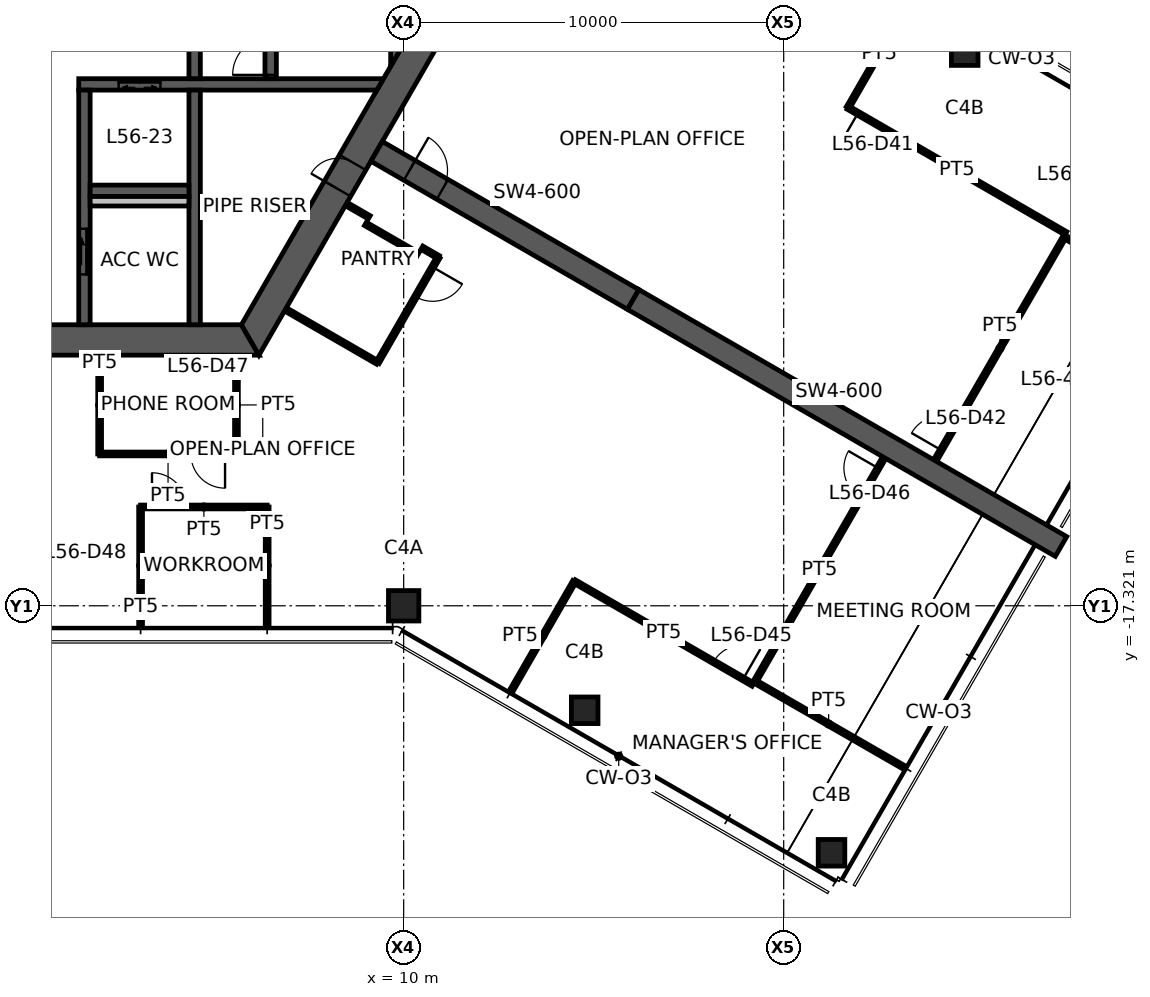
"""IFC4 building model, lengths in metres.
Left out: names, types, materials, properties, quantities, classifications, styles, units other than length and angle.
Written with IfcOpenShell. Run it as: python <this file> out.ifc"""

import sys

from ifc_helpers import new_model, si_unit, direction, frame, frame_2d, origin, origin_2d, place, context, subcontext, project, spatial, polyline, rectangle, hollow_rectangle, outline, extrude, element, fill, save


model = new_model("IFC4")
c1 = context("Model", 3, precision=1e-05, world=origin(), true_north=direction((0.0, 1.0)))
c2 = subcontext(c1, "Body", "Model", "MODEL_VIEW")
j1 = project(units=[si_unit("LENGTHUNIT", "METRE"), si_unit("PLANEANGLEUNIT", "RADIAN")], contexts=[c1])
p1 = place(None, origin())
s1 = spatial("IfcSite", under=j1, at=p1, CompositionType="ELEMENT")
p2 = place(p1, origin())
s2 = spatial("IfcBuilding", under=s1, at=p2, CompositionType="ELEMENT")
p3 = place(p2, frame((0.0, 0.0, 224.5)))
s3 = spatial("IfcBuildingStorey", under=s2, at=p3, CompositionType="ELEMENT", Elevation=224.5)
p4 = place(p3, frame((10.0, -17.321, 0.0), z_axis=(0.0, 0.0, 1.0), x_axis=(1.0, 0.0, 0.0)))
e1 = element("IfcColumn", 1, at=p4, inside=s3, PredefinedType="COLUMN", context=c2, shape_type="SweptSolid", body=[
    extrude(hollow_rectangle(XDim=0.8, YDim=0.8, WallThickness=0.04, at=origin_2d()), origin(), (0.0, 0.0, 1.0), 3.9),
])
for number, where, z_axis, x_axis in (
    (2, (14.763, -20.071, 0.0), (0.0, 0.0, 1.0), (1.0, 0.0, 0.0)),
    (3, (21.258, -23.821, 0.0), (0.0, 0.0, 1.0), (1.0, 0.0, 0.0)),
    (4, (24.763, -2.75, 0.0), (0.0, 0.0, 1.0), (1.0, 0.0, 0.0)),
):
    element("IfcColumn", number, at=place(p3, frame(where, z_axis=z_axis, x_axis=x_axis)), inside=s3, PredefinedType="COLUMN", context=c2, shape_type="SweptSolid", body=[
        extrude(hollow_rectangle(XDim=0.7, YDim=0.7, WallThickness=0.032, at=origin_2d()), origin(), (0.0, 0.0, 1.0), 3.9),
    ])
p5 = place(p3, frame((-5.961, -10.325, 0.0), z_axis=(0.0, 0.0, 1.0), x_axis=(1.0, 0.0, 0.0)))
e5 = element("IfcWall", 5, at=p5, inside=s3, PredefinedType="SHEAR", context=c2, shape_type="SweptSolid", body=[
    extrude(outline(polyline([(-0.231, -0.4), (5.461, -0.4), (6.461, -0.4), (12.153, -0.4), (11.691, 0.4), (6.461, 0.4), (5.461, 0.4), (0.231, 0.4), (-0.231, -0.4)])), origin(), (0.0, 0.0, 1.0), 3.9),
])
p6 = place(p5, frame((5.461, 0.0, 0.0)))
e6 = element("IfcOpeningElement", 6, at=p6, cuts=e5, PredefinedType="OPENING", context=c2, shape_type="SweptSolid", body=[
    extrude(rectangle(XDim=1.0, YDim=2.1, at=frame_2d((0.5, 1.05))), frame((0.0, 0.41, 0.0), z_axis=(0.0, -1.0, 0.0), x_axis=(1.0, 0.0, 0.0)), (0.0, 0.0, 1.0), 0.82),
])
p7 = place(p3, frame((5.961, -10.325, 0.0), z_axis=(0.0, 0.0, 1.0), x_axis=(0.500004296715, 0.866022923061, 0.0)))
e7 = element("IfcWall", 7, at=p7, inside=s3, PredefinedType="SHEAR", context=c2, shape_type="SweptSolid", body=[
    extrude(outline(polyline([(-0.231, -0.4), (4.594, -0.4), (5.394, -0.4), (12.153, -0.4), (11.691, 0.4), (5.394, 0.4), (4.594, 0.4), (0.231, 0.4), (-0.231, -0.4)])), origin(), (0.0, 0.0, 1.0), 3.9),
])
p8 = place(p7, frame((4.594, 0.0, 0.0)))
e8 = element("IfcOpeningElement", 8, at=p8, cuts=e7, PredefinedType="OPENING", context=c2, shape_type="SweptSolid", body=[
    extrude(rectangle(XDim=0.8, YDim=2.1, at=frame_2d((0.4, 1.05))), frame((0.0, 0.41, 0.0), z_axis=(0.0, -1.0, 0.0), x_axis=(1.0, 0.0, 0.0)), (0.0, 0.0, 1.0), 0.82),
])
p9 = place(p3, frame((9.288, -5.363, 0.0), z_axis=(0.0, 0.0, 1.0), x_axis=(0.866031736626, -0.499989031036, 0.0)))
e9 = element("IfcWall", 9, at=p9, inside=s3, PredefinedType="SHEAR", context=c2, shape_type="SweptSolid", body=[
    extrude(rectangle(XDim=7.796, YDim=0.6, at=frame_2d((3.898, 0.0))), origin(), (0.0, 0.0, 1.0), 3.9),
])
p10 = place(p9, frame((1.0, 0.0, 0.0)))
e10 = element("IfcOpeningElement", 10, at=p10, cuts=e9, PredefinedType="OPENING", context=c2, shape_type="SweptSolid", body=[
    extrude(rectangle(XDim=1.0, YDim=2.1, at=frame_2d((0.5, 1.05))), frame((0.0, 0.31, 0.0), z_axis=(0.0, -1.0, 0.0), x_axis=(1.0, 0.0, 0.0)), (0.0, 0.0, 1.0), 0.62),
])
p11 = place(p3, frame((16.039, -9.26, 0.0), z_axis=(0.0, 0.0, 1.0), x_axis=(0.866024837091, -0.50000098154, 0.0)))
e11 = element("IfcWall", 11, at=p11, inside=s3, PredefinedType="SHEAR", context=c2, shape_type="SweptSolid", body=[
    extrude(rectangle(XDim=13.0, YDim=0.6, at=frame_2d((6.5, 0.0))), origin(), (0.0, 0.0, 1.0), 3.9),
])
p12 = place(p3, frame((1.45, -3.6, 0.0), z_axis=(0.0, 0.0, 1.0), x_axis=(1.0, 0.0, 0.0)))
e12 = element("IfcWall", 12, at=p12, inside=s3, PredefinedType="SHEAR", context=c2, shape_type="SweptSolid", body=[
    extrude(outline(polyline([(0.0, -0.15), (1.05, -0.15), (2.15, -0.15), (7.845, -0.15), (8.019, 0.15), (2.15, 0.15), (1.05, 0.15), (0.0, 0.15), (0.0, -0.15)])), origin(), (0.0, 0.0, 1.0), 3.9),
])
p13 = place(p12, frame((1.05, 0.0, 0.0)))
e13 = element("IfcOpeningElement", 13, at=p13, cuts=e12, PredefinedType="OPENING", context=c2, shape_type="SweptSolid", body=[
    extrude(rectangle(XDim=1.1, YDim=2.1, at=frame_2d((0.55, 1.05))), frame((0.0, 0.16, 0.0), z_axis=(0.0, -1.0, 0.0), x_axis=(1.0, 0.0, 0.0)), (0.0, 0.0, 1.0), 0.32),
])
p14 = place(p3, frame((1.6, -3.75, 0.0), z_axis=(0.0, 0.0, 1.0), x_axis=(0.0, -1.0, 0.0)))
e14 = element("IfcWall", 14, at=p14, inside=s3, PredefinedType="SHEAR", context=c2, shape_type="SweptSolid", body=[
    extrude(rectangle(XDim=6.175, YDim=0.3, at=frame_2d((3.087, 0.0))), origin(), (0.0, 0.0, 1.0), 3.9),
])
p15 = place(p14, frame((3.65, 0.0, 0.0)))
e15 = element("IfcOpeningElement", 15, at=p15, cuts=e14, PredefinedType="OPENING", context=c2, shape_type="SweptSolid", body=[
    extrude(rectangle(XDim=1.2, YDim=2.1, at=frame_2d((0.6, 1.05))), frame((0.0, 0.16, 0.0), z_axis=(0.0, -1.0, 0.0), x_axis=(1.0, 0.0, 0.0)), (0.0, 0.0, 1.0), 0.32),
])
p16 = place(p3, frame((4.5, -3.45, 0.0), z_axis=(0.0, 0.0, 1.0), x_axis=(0.0, 1.0, 0.0)))
e16 = element("IfcWall", 16, at=p16, inside=s3, PredefinedType="SHEAR", context=c2, shape_type="SweptSolid", body=[
    extrude(rectangle(XDim=6.9, YDim=0.3, at=frame_2d((3.45, 0.0))), origin(), (0.0, 0.0, 1.0), 3.9),
])
p17 = place(p16, frame((2.95, 0.0, 0.0)))
e17 = element("IfcOpeningElement", 17, at=p17, cuts=e16, PredefinedType="OPENING", context=c2, shape_type="SweptSolid", body=[
    extrude(rectangle(XDim=1.0, YDim=2.1, at=frame_2d((0.5, 1.05))), frame((0.0, 0.16, 0.0), z_axis=(0.0, -1.0, 0.0), x_axis=(1.0, 0.0, 0.0)), (0.0, 0.0, 1.0), 0.32),
])
p18 = place(p3, frame((6.5, -3.45, 0.0), z_axis=(0.0, 0.0, 1.0), x_axis=(0.0, 1.0, 0.0)))
e18 = element("IfcWall", 18, at=p18, inside=s3, PredefinedType="SHEAR", context=c2, shape_type="SweptSolid", body=[
    extrude(rectangle(XDim=6.9, YDim=0.3, at=frame_2d((3.45, 0.0))), origin(), (0.0, 0.0, 1.0), 3.9),
])
p19 = place(p18, frame((0.1, 0.0, 0.0)))
e19 = element("IfcOpeningElement", 19, at=p19, cuts=e18, PredefinedType="OPENING", context=c2, shape_type="SweptSolid", body=[
    extrude(rectangle(XDim=1.0, YDim=2.1, at=frame_2d((0.5, 1.05))), frame((0.0, 0.16, 0.0), z_axis=(0.0, -1.0, 0.0), x_axis=(1.0, 0.0, 0.0)), (0.0, 0.0, 1.0), 0.32),
])
p20 = place(p3, frame((4.5, -3.75, 0.0), z_axis=(0.0, 0.0, 1.0), x_axis=(0.0, -1.0, 0.0)))
e20 = element("IfcWall", 20, at=p20, inside=s3, PredefinedType="SHEAR", context=c2, shape_type="SweptSolid", body=[
    extrude(rectangle(XDim=6.175, YDim=0.3, at=frame_2d((3.087, 0.0))), origin(), (0.0, 0.0, 1.0), 3.9),
])
p21 = place(p3, frame((1.75, -6.4, 0.0), z_axis=(0.0, 0.0, 1.0), x_axis=(1.0, 0.0, 0.0)))
e21 = element("IfcWall", 21, at=p21, inside=s3, PredefinedType="SHEAR", context=c2, shape_type="SweptSolid", body=[
    extrude(rectangle(XDim=2.6, YDim=0.3, at=frame_2d((1.3, 0.0))), origin(), (0.0, 0.0, 1.0), 3.9),
])
p22 = place(p3, frame((9.808, -2.862, 0.0), z_axis=(0.0, 0.0, 1.0), x_axis=(0.0, 1.0, 0.0)))
e22 = element("IfcWall", 22, at=p22, inside=s3, PredefinedType="SHEAR", context=c2, shape_type="SweptSolid", body=[
    extrude(outline(polyline([(0.26, -0.15), (5.465, -0.15), (5.984, 0.15), (-0.26, 0.15), (0.26, -0.15)])), origin(), (0.0, 0.0, 1.0), 3.9),
])
p23 = place(p3, frame((1.75, -6.675, 0.0), z_axis=(0.0, 0.0, 1.0), x_axis=(1.0, 0.0, 0.0)))
e23 = element("IfcWall", 23, at=p23, inside=s3, PredefinedType="PLUMBINGWALL", context=c2, shape_type="SweptSolid", body=[
    extrude(rectangle(XDim=2.6, YDim=0.25, at=frame_2d((1.3, 0.0))), origin(), (0.0, 0.0, 1.0), 3.9),
])
p24 = place(p3, frame((30.25, -9.266, 0.0), z_axis=(0.0, 0.0, 1.0), x_axis=(-0.865342122637, 0.501181614577, 0.0)))
e24 = element("IfcWall", 24, at=p24, inside=s3, PredefinedType="PARTITIONING", context=c2, shape_type="SweptSolid", body=[
    extrude(rectangle(XDim=3.311, YDim=0.1, at=frame_2d((1.655, 0.0))), origin(), (0.0, 0.0, 1.0), 2.95),
])
p25 = place(p3, frame((21.692, -4.21, 0.0), z_axis=(0.0, 0.0, 1.0), x_axis=(0.50002956483, 0.866008333849, 0.0)))
e25 = element("IfcWall", 25, at=p25, inside=s3, PredefinedType="PARTITIONING", context=c2, shape_type="SweptSolid", body=[
    extrude(rectangle(XDim=3.28, YDim=0.1, at=frame_2d((1.64, 0.0))), origin(), (0.0, 0.0, 1.0), 2.95),
])
p26 = place(p3, frame((27.425, -7.52, 0.0), z_axis=(0.0, 0.0, 1.0), x_axis=(-0.866030817826, 0.499990622488, 0.0)))
e26 = element("IfcWall", 26, at=p26, inside=s3, PredefinedType="PARTITIONING", context=c2, shape_type="SweptSolid", body=[
    extrude(rectangle(XDim=6.62, YDim=0.1, at=frame_2d((3.31, 0.0))), origin(), (0.0, 0.0, 1.0), 2.95),
])
p27 = place(p26, frame((5.42, 0.0, 0.0)))
e27 = element("IfcOpeningElement", 27, at=p27, cuts=e26, PredefinedType="OPENING", context=c2, shape_type="SweptSolid", body=[
    extrude(rectangle(XDim=0.9, YDim=2.1, at=frame_2d((0.45, 1.05))), frame((0.0, 0.06, 0.0), z_axis=(0.0, -1.0, 0.0), x_axis=(1.0, 0.0, 0.0)), (0.0, 0.0, 1.0), 0.12),
])
p28 = place(p3, frame((23.993, -13.483, 0.0), z_axis=(0.0, 0.0, 1.0), x_axis=(0.500522347083, 0.865723616445, 0.0)))
e28 = element("IfcWall", 28, at=p28, inside=s3, PredefinedType="PARTITIONING", context=c2, shape_type="SweptSolid", body=[
    extrude(rectangle(XDim=6.78, YDim=0.1, at=frame_2d((3.39, 0.0))), origin(), (0.0, 0.0, 1.0), 2.95),
])
p29 = place(p28, frame((0.3, 0.0, 0.0)))
e29 = element("IfcOpeningElement", 29, at=p29, cuts=e28, PredefinedType="OPENING", context=c2, shape_type="SweptSolid", body=[
    extrude(rectangle(XDim=0.9, YDim=2.1, at=frame_2d((0.45, 1.05))), frame((0.0, 0.06, 0.0), z_axis=(0.0, -1.0, 0.0), x_axis=(1.0, 0.0, 0.0)), (0.0, 0.0, 1.0), 0.12),
])
p30 = place(p3, frame((8.505, -6.758, 0.0), z_axis=(0.0, 0.0, 1.0), x_axis=(0.865958369053, -0.50011608959, 0.0)))
e30 = element("IfcWall", 30, at=p30, inside=s3, PredefinedType="PARTITIONING", context=c2, shape_type="SweptSolid", body=[
    extrude(rectangle(XDim=0.68, YDim=0.1, at=frame_2d((0.34, 0.0))), origin(), (0.0, 0.0, 1.0), 2.95),
])
p31 = place(p3, frame((8.994, -7.271, 0.0), z_axis=(0.0, 0.0, 1.0), x_axis=(0.865989903783, -0.500061482766, 0.0)))
e31 = element("IfcWall", 31, at=p31, inside=s3, PredefinedType="PARTITIONING", context=c2, shape_type="SweptSolid", body=[
    extrude(rectangle(XDim=1.6, YDim=0.1, at=frame_2d((0.8, 0.0))), origin(), (0.0, 0.0, 1.0), 2.95),
])
p32 = place(p3, frame((9.313, -10.919, 0.0), z_axis=(0.0, 0.0, 1.0), x_axis=(-0.865996920067, 0.500049332001, 0.0)))
e32 = element("IfcWall", 32, at=p32, inside=s3, PredefinedType="PARTITIONING", context=c2, shape_type="SweptSolid", body=[
    extrude(rectangle(XDim=2.78, YDim=0.1, at=frame_2d((1.39, 0.0))), origin(), (0.0, 0.0, 1.0), 2.95),
])
p33 = place(p3, frame((10.48, -7.898, 0.0), z_axis=(0.0, 0.0, 1.0), x_axis=(0.866071776036, -0.499919672301, 0.0)))
e33 = element("IfcWall", 33, at=p33, inside=s3, PredefinedType="PARTITIONING", context=c2, shape_type="SweptSolid", body=[
    extrude(rectangle(XDim=0.5, YDim=0.1, at=frame_2d((0.25, 0.0))), origin(), (0.0, 0.0, 1.0), 2.95),
])
p34 = place(p3, frame((10.913, -8.148, 0.0), z_axis=(0.0, 0.0, 1.0), x_axis=(-0.500028443584, -0.866008981251, 0.0)))
e34 = element("IfcWall", 34, at=p34, inside=s3, PredefinedType="PARTITIONING", context=c2, shape_type="SweptSolid", body=[
    extrude(rectangle(XDim=3.2, YDim=0.1, at=frame_2d((1.6, 0.0))), origin(), (0.0, 0.0, 1.0), 2.95),
])
p35 = place(p34, frame((0.3, 0.0, 0.0)))
e35 = element("IfcOpeningElement", 35, at=p35, cuts=e34, PredefinedType="OPENING", context=c2, shape_type="SweptSolid", body=[
    extrude(rectangle(XDim=0.9, YDim=2.1, at=frame_2d((0.45, 1.05))), frame((0.0, 0.06, 0.0), z_axis=(0.0, -1.0, 0.0), x_axis=(1.0, 0.0, 0.0)), (0.0, 0.0, 1.0), 0.12),
])
p36 = place(p3, frame((19.241, -19.313, 0.0), z_axis=(0.0, 0.0, 1.0), x_axis=(0.866534622614, -0.499116968066, 0.0)))
e36 = element("IfcWall", 36, at=p36, inside=s3, PredefinedType="PARTITIONING", context=c2, shape_type="SweptSolid", body=[
    extrude(rectangle(XDim=4.48, YDim=0.1, at=frame_2d((2.24, 0.0))), origin(), (0.0, 0.0, 1.0), 2.95),
])
p37 = place(p3, frame((12.837, -19.548, 0.0), z_axis=(0.0, 0.0, 1.0), x_axis=(0.499890550747, 0.866088585119, 0.0)))
e37 = element("IfcWall", 37, at=p37, inside=s3, PredefinedType="PARTITIONING", context=c2, shape_type="SweptSolid", body=[
    extrude(rectangle(XDim=3.311, YDim=0.1, at=frame_2d((1.655, 0.0))), origin(), (0.0, 0.0, 1.0), 2.95),
])
p38 = place(p3, frame((14.492, -16.68, 0.0), z_axis=(0.0, 0.0, 1.0), x_axis=(0.866056782721, -0.499945646148, 0.0)))
e38 = element("IfcWall", 38, at=p38, inside=s3, PredefinedType="PARTITIONING", context=c2, shape_type="SweptSolid", body=[
    extrude(rectangle(XDim=5.429, YDim=0.1, at=frame_2d((2.714, 0.0))), origin(), (0.0, 0.0, 1.0), 2.95),
])
p39 = place(p38, frame((4.229, 0.0, 0.0)))
e39 = element("IfcOpeningElement", 39, at=p39, cuts=e38, PredefinedType="OPENING", context=c2, shape_type="SweptSolid", body=[
    extrude(rectangle(XDim=0.9, YDim=2.1, at=frame_2d((0.45, 1.05))), frame((0.0, 0.06, 0.0), z_axis=(0.0, -1.0, 0.0), x_axis=(1.0, 0.0, 0.0)), (0.0, 0.0, 1.0), 0.12),
])
p40 = place(p3, frame((19.248, -19.311, 0.0), z_axis=(0.0, 0.0, 1.0), x_axis=(0.499489671712, 0.866319841544, 0.0)))
e40 = element("IfcWall", 40, at=p40, inside=s3, PredefinedType="PARTITIONING", context=c2, shape_type="SweptSolid", body=[
    extrude(rectangle(XDim=6.78, YDim=0.1, at=frame_2d((3.39, 0.0))), origin(), (0.0, 0.0, 1.0), 2.95),
])
p41 = place(p40, frame((5.58, 0.0, 0.0)))
e41 = element("IfcOpeningElement", 41, at=p41, cuts=e40, PredefinedType="OPENING", context=c2, shape_type="SweptSolid", body=[
    extrude(rectangle(XDim=0.9, YDim=2.1, at=frame_2d((0.45, 1.05))), frame((0.0, 0.06, 0.0), z_axis=(0.0, -1.0, 0.0), x_axis=(1.0, 0.0, 0.0)), (0.0, 0.0, 1.0), 0.12),
])
p42 = place(p3, frame((2.0, -13.325, 0.0), z_axis=(0.0, 0.0, 1.0), x_axis=(0.0, 1.0, 0.0)))
e42 = element("IfcWall", 42, at=p42, inside=s3, PredefinedType="PARTITIONING", context=c2, shape_type="SweptSolid", body=[
    extrude(rectangle(XDim=2.58, YDim=0.1, at=frame_2d((1.29, 0.0))), origin(), (0.0, 0.0, 1.0), 2.95),
])
p43 = place(p3, frame((5.6, -13.325, 0.0), z_axis=(0.0, 0.0, 1.0), x_axis=(-1.0, 0.0, 0.0)))
e43 = element("IfcWall", 43, at=p43, inside=s3, PredefinedType="PARTITIONING", context=c2, shape_type="SweptSolid", body=[
    extrude(rectangle(XDim=3.6, YDim=0.1, at=frame_2d((1.8, 0.0))), origin(), (0.0, 0.0, 1.0), 2.95),
])
p44 = place(p43, frame((0.3, 0.0, 0.0)))
e44 = element("IfcOpeningElement", 44, at=p44, cuts=e43, PredefinedType="OPENING", context=c2, shape_type="SweptSolid", body=[
    extrude(rectangle(XDim=0.9, YDim=2.1, at=frame_2d((0.45, 1.05))), frame((0.0, 0.06, 0.0), z_axis=(0.0, -1.0, 0.0), x_axis=(1.0, 0.0, 0.0)), (0.0, 0.0, 1.0), 0.12),
])
p45 = place(p3, frame((5.6, -10.745, 0.0), z_axis=(0.0, 0.0, 1.0), x_axis=(0.0, -1.0, 0.0)))
e45 = element("IfcWall", 45, at=p45, inside=s3, PredefinedType="PARTITIONING", context=c2, shape_type="SweptSolid", body=[
    extrude(rectangle(XDim=2.58, YDim=0.1, at=frame_2d((1.29, 0.0))), origin(), (0.0, 0.0, 1.0), 2.95),
])
p46 = place(p3, frame((3.077, -17.801, 0.0), z_axis=(0.0, 0.0, 1.0), x_axis=(0.0, 1.0, 0.0)))
e46 = element("IfcWall", 46, at=p46, inside=s3, PredefinedType="PARTITIONING", context=c2, shape_type="SweptSolid", body=[
    extrude(rectangle(XDim=3.08, YDim=0.1, at=frame_2d((1.54, 0.0))), origin(), (0.0, 0.0, 1.0), 2.95),
])
p47 = place(p3, frame((3.077, -14.72, 0.0), z_axis=(0.0, 0.0, 1.0), x_axis=(1.0, 0.0, 0.0)))
e47 = element("IfcWall", 47, at=p47, inside=s3, PredefinedType="PARTITIONING", context=c2, shape_type="SweptSolid", body=[
    extrude(rectangle(XDim=3.331, YDim=0.1, at=frame_2d((1.666, 0.0))), origin(), (0.0, 0.0, 1.0), 2.95),
])
p48 = place(p47, frame((0.3, 0.0, 0.0)))
e48 = element("IfcOpeningElement", 48, at=p48, cuts=e47, PredefinedType="OPENING", context=c2, shape_type="SweptSolid", body=[
    extrude(rectangle(XDim=0.9, YDim=2.1, at=frame_2d((0.45, 1.05))), frame((0.0, 0.06, 0.0), z_axis=(0.0, -1.0, 0.0), x_axis=(1.0, 0.0, 0.0)), (0.0, 0.0, 1.0), 0.12),
])
p49 = place(p3, frame((6.408, -14.72, 0.0), z_axis=(0.0, 0.0, 1.0), x_axis=(0.0, -1.0, 0.0)))
e49 = element("IfcWall", 49, at=p49, inside=s3, PredefinedType="PARTITIONING", context=c2, shape_type="SweptSolid", body=[
    extrude(rectangle(XDim=3.08, YDim=0.1, at=frame_2d((1.54, 0.0))), origin(), (0.0, 0.0, 1.0), 2.95),
])
p50 = place(p8, origin())
e50 = element("IfcDoor", 50, at=p50, inside=s3, OperationType="SINGLE_SWING_LEFT", PredefinedType="DOOR", context=c2, shape_type="SweptSolid", body=[
    extrude(rectangle(XDim=0.8, YDim=2.1, at=frame_2d((0.4, 1.05))), frame((0.0, 0.025, 0.0), z_axis=(0.0, -1.0, 0.0), x_axis=(1.0, 0.0, 0.0)), (0.0, 0.0, 1.0), 0.05),
])
fill(e8, e50)
p51 = place(p19, origin())
e51 = element("IfcDoor", 51, at=p51, inside=s3, OperationType="SINGLE_SWING_LEFT", PredefinedType="DOOR", context=c2, shape_type="SweptSolid", body=[
    extrude(rectangle(XDim=1.0, YDim=2.1, at=frame_2d((0.5, 1.05))), frame((0.0, 0.025, 0.0), z_axis=(0.0, -1.0, 0.0), x_axis=(1.0, 0.0, 0.0)), (0.0, 0.0, 1.0), 0.05),
])
fill(e19, e51)
p52 = place(p15, origin())
e52 = element("IfcDoor", 52, at=p52, inside=s3, OperationType="SLIDING_TO_LEFT", PredefinedType="DOOR", context=c2, shape_type="SweptSolid", body=[
    extrude(rectangle(XDim=1.2, YDim=2.1, at=frame_2d((0.6, 1.05))), frame((0.0, 0.025, 0.0), z_axis=(0.0, -1.0, 0.0), x_axis=(1.0, 0.0, 0.0)), (0.0, 0.0, 1.0), 0.05),
])
fill(e15, e52)
p53 = place(p10, origin())
e53 = element("IfcDoor", 53, at=p53, inside=s3, OperationType="SINGLE_SWING_LEFT", PredefinedType="DOOR", context=c2, shape_type="SweptSolid", body=[
    extrude(rectangle(XDim=1.0, YDim=2.1, at=frame_2d((0.5, 1.05))), frame((0.0, 0.025, 0.0), z_axis=(0.0, -1.0, 0.0), x_axis=(1.0, 0.0, 0.0)), (0.0, 0.0, 1.0), 0.05),
])
fill(e10, e53)
p54 = place(p27, origin())
e54 = element("IfcDoor", 54, at=p54, inside=s3, OperationType="SINGLE_SWING_RIGHT", PredefinedType="DOOR", context=c2, shape_type="SweptSolid", body=[
    extrude(rectangle(XDim=0.9, YDim=2.1, at=frame_2d((0.45, 1.05))), frame((0.0, 0.025, 0.0), z_axis=(0.0, -1.0, 0.0), x_axis=(1.0, 0.0, 0.0)), (0.0, 0.0, 1.0), 0.05),
])
fill(e27, e54)
p55 = place(p29, origin())
e55 = element("IfcDoor", 55, at=p55, inside=s3, OperationType="SINGLE_SWING_LEFT", PredefinedType="DOOR", context=c2, shape_type="SweptSolid", body=[
    extrude(rectangle(XDim=0.9, YDim=2.1, at=frame_2d((0.45, 1.05))), frame((0.0, 0.025, 0.0), z_axis=(0.0, -1.0, 0.0), x_axis=(1.0, 0.0, 0.0)), (0.0, 0.0, 1.0), 0.05),
])
fill(e29, e55)
p56 = place(p35, origin())
e56 = element("IfcDoor", 56, at=p56, inside=s3, OperationType="SINGLE_SWING_LEFT", PredefinedType="DOOR", context=c2, shape_type="SweptSolid", body=[
    extrude(rectangle(XDim=0.9, YDim=2.1, at=frame_2d((0.45, 1.05))), frame((0.0, 0.025, 0.0), z_axis=(0.0, -1.0, 0.0), x_axis=(1.0, 0.0, 0.0)), (0.0, 0.0, 1.0), 0.05),
])
fill(e35, e56)
p57 = place(p39, origin())
e57 = element("IfcDoor", 57, at=p57, inside=s3, OperationType="SINGLE_SWING_RIGHT", PredefinedType="DOOR", context=c2, shape_type="SweptSolid", body=[
    extrude(rectangle(XDim=0.9, YDim=2.1, at=frame_2d((0.45, 1.05))), frame((0.0, 0.025, 0.0), z_axis=(0.0, -1.0, 0.0), x_axis=(1.0, 0.0, 0.0)), (0.0, 0.0, 1.0), 0.05),
])
fill(e39, e57)
p58 = place(p41, origin())
e58 = element("IfcDoor", 58, at=p58, inside=s3, OperationType="SINGLE_SWING_RIGHT", PredefinedType="DOOR", context=c2, shape_type="SweptSolid", body=[
    extrude(rectangle(XDim=0.9, YDim=2.1, at=frame_2d((0.45, 1.05))), frame((0.0, 0.025, 0.0), z_axis=(0.0, -1.0, 0.0), x_axis=(1.0, 0.0, 0.0)), (0.0, 0.0, 1.0), 0.05),
])
fill(e41, e58)
p59 = place(p44, origin())
e59 = element("IfcDoor", 59, at=p59, inside=s3, OperationType="SINGLE_SWING_LEFT", PredefinedType="DOOR", context=c2, shape_type="SweptSolid", body=[
    extrude(rectangle(XDim=0.9, YDim=2.1, at=frame_2d((0.45, 1.05))), frame((0.0, 0.025, 0.0), z_axis=(0.0, -1.0, 0.0), x_axis=(1.0, 0.0, 0.0)), (0.0, 0.0, 1.0), 0.05),
])
fill(e44, e59)
p60 = place(p48, origin())
e60 = element("IfcDoor", 60, at=p60, inside=s3, OperationType="SINGLE_SWING_LEFT", PredefinedType="DOOR", context=c2, shape_type="SweptSolid", body=[
    extrude(rectangle(XDim=0.9, YDim=2.1, at=frame_2d((0.45, 1.05))), frame((0.0, 0.025, 0.0), z_axis=(0.0, -1.0, 0.0), x_axis=(1.0, 0.0, 0.0)), (0.0, 0.0, 1.0), 0.05),
])
fill(e48, e60)
p61 = place(p13, origin())
e61 = element("IfcDoor", 61, at=p61, inside=s3, OperationType="DOUBLE_DOOR_SLIDING", PredefinedType="DOOR", context=c2, shape_type="SweptSolid", body=[
    extrude(rectangle(XDim=1.1, YDim=2.1, at=frame_2d((0.55, 1.05))), frame((0.0, 0.025, 0.0), z_axis=(0.0, -1.0, 0.0), x_axis=(1.0, 0.0, 0.0)), (0.0, 0.0, 1.0), 0.05),
])
fill(e13, e61)
save(model, sys.argv[1])
